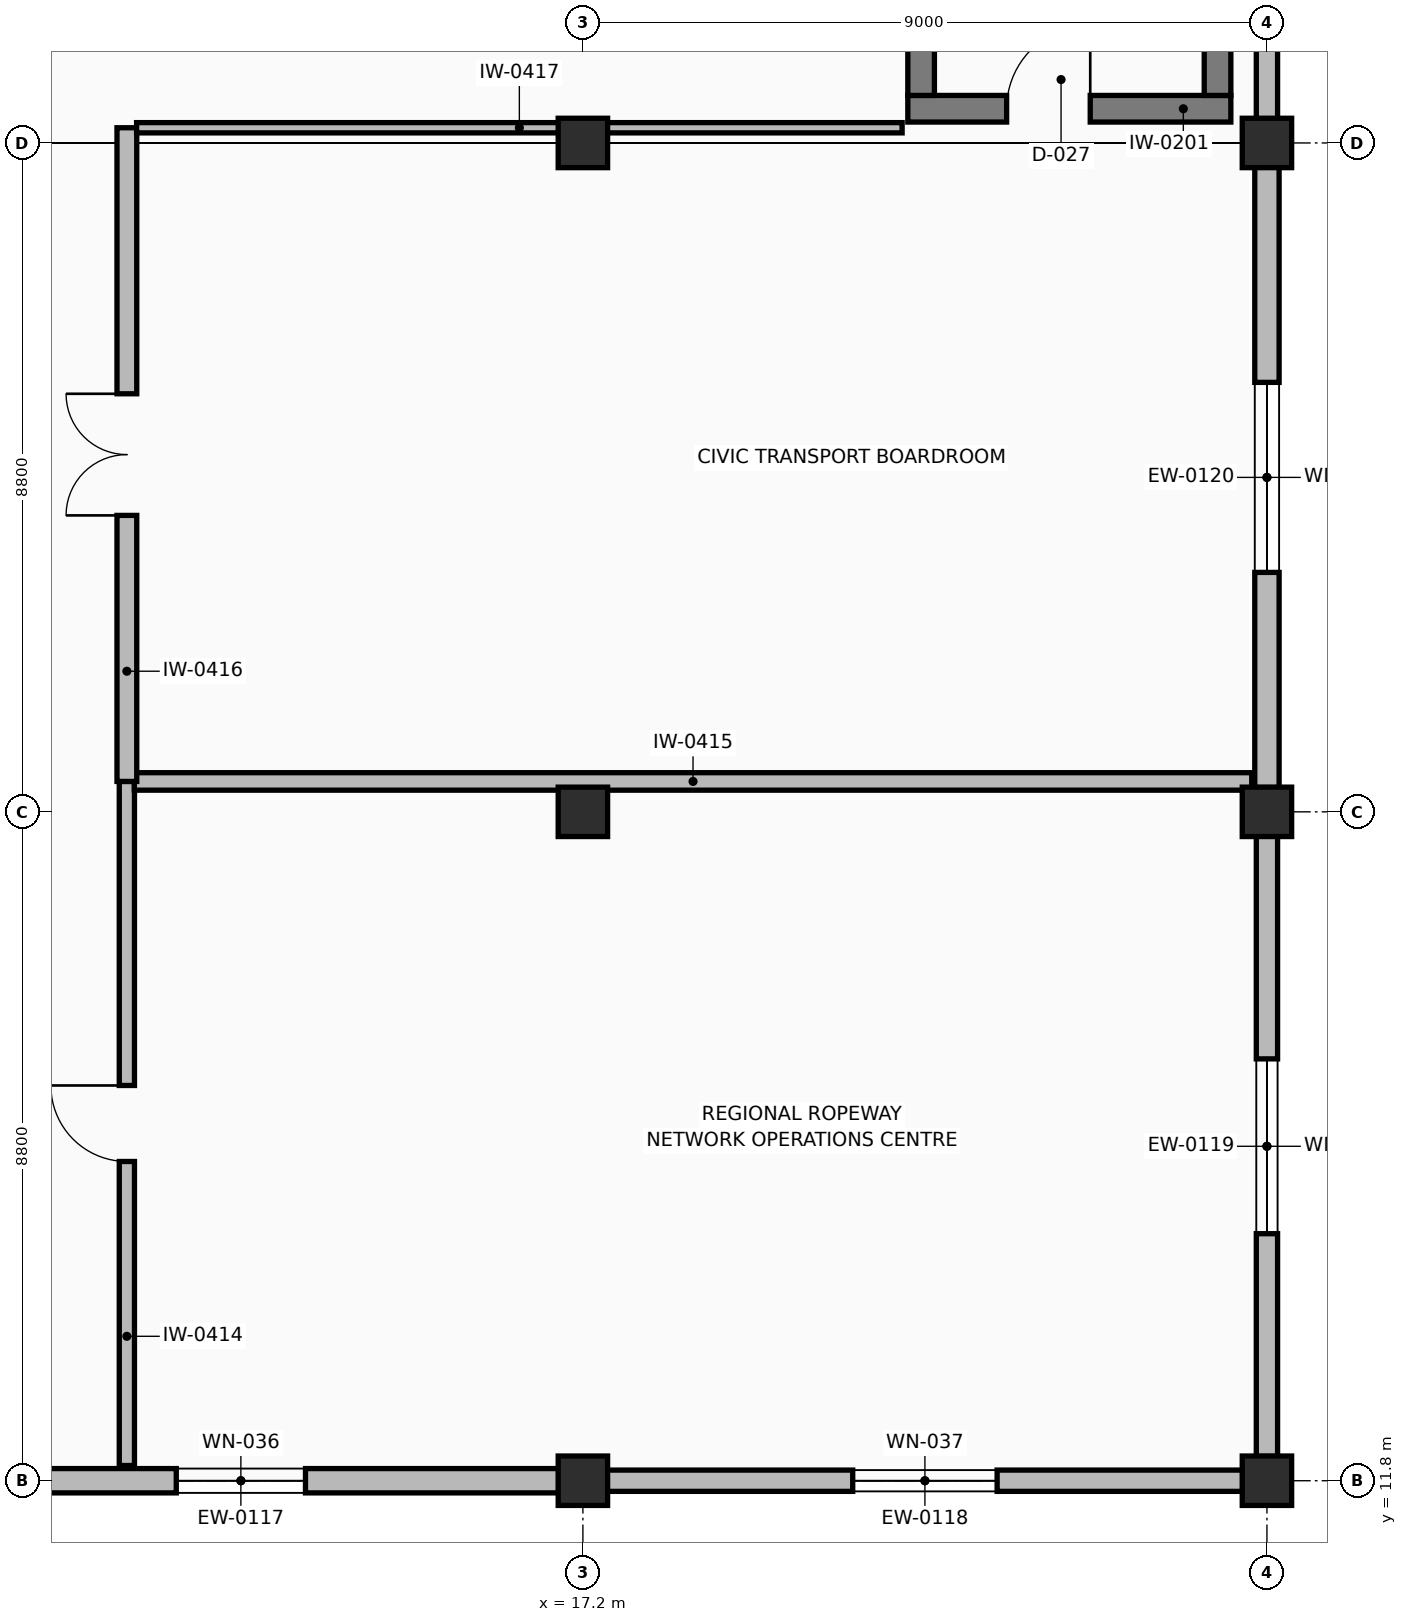
"""IFC4 building model, lengths in metres.
Left out: names, types, materials, properties, quantities, classifications, styles, units other than length and angle.
Written with IfcOpenShell. Run it as: python <this file> out.ifc"""

import sys

from ifc_helpers import new_model, si_unit, direction, frame, frame_2d, origin, origin_2d, place, context, subcontext, project, spatial, rectangle, extrude, element, fill, save


model = new_model("IFC4")
c1 = context("Model", 3, precision=1e-05, world=origin(), true_north=direction((0.0, 1.0)))
c2 = subcontext(c1, "Body", "Model", "MODEL_VIEW")
j1 = project(units=[si_unit("LENGTHUNIT", "METRE"), si_unit("PLANEANGLEUNIT", "RADIAN")], contexts=[c1])
p1 = place(None, origin())
s1 = spatial("IfcSite", under=j1, at=p1, CompositionType="ELEMENT")
p2 = place(p1, origin())
s2 = spatial("IfcBuilding", under=s1, at=p2, CompositionType="ELEMENT")
p3 = place(p2, frame((0.0, 0.0, 14.4)))
s3 = spatial("IfcBuildingStorey", under=s2, at=p3, CompositionType="ELEMENT", Elevation=14.4)
for number, where, z_axis, x_axis in (
    (1, (17.2, 11.8, 0.0), (0.0, 0.0, 1.0), (1.0, 0.0, 0.0)),
    (2, (17.2, 20.6, 0.0), (0.0, 0.0, 1.0), (1.0, 0.0, 0.0)),
    (3, (17.2, 29.4, 0.0), (0.0, 0.0, 1.0), (1.0, 0.0, 0.0)),
    (4, (26.2, 11.8, 0.0), (0.0, 0.0, 1.0), (1.0, 0.0, 0.0)),
    (5, (26.2, 20.6, 0.0), (0.0, 0.0, 1.0), (1.0, 0.0, 0.0)),
    (6, (26.2, 29.4, 0.0), (0.0, 0.0, 1.0), (1.0, 0.0, 0.0)),
):
    element("IfcColumn", number, at=place(p3, frame(where, z_axis=z_axis, x_axis=x_axis)), inside=s3, PredefinedType="COLUMN", context=c2, shape_type="SweptSolid", body=[
        extrude(rectangle(XDim=0.65, YDim=0.65, at=origin_2d()), origin(), (0.0, 0.0, 1.0), 4.5),
    ])
p4 = place(p3, frame((8.52, 11.8, 0.0), z_axis=(0.0, 0.0, 1.0), x_axis=(1.0, 0.0, 0.0)))
e7 = element("IfcWall", 7, at=p4, inside=s3, PredefinedType="SOLIDWALL", context=c2, shape_type="SweptSolid", body=[
    extrude(rectangle(XDim=8.36, YDim=0.32, at=frame_2d((4.18, 0.0))), origin(), (0.0, 0.0, 1.0), 3.375),
])
p5 = place(p4, frame((3.33, 0.0, 0.9)))
e8 = element("IfcOpeningElement", 8, at=p5, cuts=e7, PredefinedType="OPENING", context=c2, shape_type="SweptSolid", body=[
    extrude(rectangle(XDim=1.7, YDim=1.5, at=frame_2d((0.85, 0.75))), frame((0.0, 0.17, 0.0), z_axis=(0.0, -1.0, 0.0), x_axis=(1.0, 0.0, 0.0)), (0.0, 0.0, 1.0), 0.34),
])
p6 = place(p3, frame((17.52, 11.8, 0.0), z_axis=(0.0, 0.0, 1.0), x_axis=(1.0, 0.0, 0.0)))
e9 = element("IfcWall", 9, at=p6, inside=s3, PredefinedType="SOLIDWALL", context=c2, shape_type="SweptSolid", body=[
    extrude(rectangle(XDim=8.36, YDim=0.28, at=frame_2d((4.18, 0.0))), origin(), (0.0, 0.0, 1.0), 3.375),
])
p7 = place(p6, frame((3.23, 0.0, 0.9)))
e10 = element("IfcOpeningElement", 10, at=p7, cuts=e9, PredefinedType="OPENING", context=c2, shape_type="SweptSolid", body=[
    extrude(rectangle(XDim=1.9, YDim=1.55, at=frame_2d((0.95, 0.775))), frame((0.0, 0.15, 0.0), z_axis=(0.0, -1.0, 0.0), x_axis=(1.0, 0.0, 0.0)), (0.0, 0.0, 1.0), 0.3),
])
p8 = place(p3, frame((26.2, 12.12, 0.0), z_axis=(0.0, 0.0, 1.0), x_axis=(0.0, 1.0, 0.0)))
e11 = element("IfcWall", 11, at=p8, inside=s3, PredefinedType="SOLIDWALL", context=c2, shape_type="SweptSolid", body=[
    extrude(rectangle(XDim=8.16, YDim=0.28, at=frame_2d((4.08, 0.0))), origin(), (0.0, 0.0, 1.0), 3.375),
])
p9 = place(p8, frame((2.93, 0.0, 0.9)))
e12 = element("IfcOpeningElement", 12, at=p9, cuts=e11, PredefinedType="OPENING", context=c2, shape_type="SweptSolid", body=[
    extrude(rectangle(XDim=2.3, YDim=1.5, at=frame_2d((1.15, 0.75))), frame((0.0, 0.15, 0.0), z_axis=(0.0, -1.0, 0.0), x_axis=(1.0, 0.0, 0.0)), (0.0, 0.0, 1.0), 0.3),
])
p10 = place(p3, frame((26.2, 20.92, 0.0), z_axis=(0.0, 0.0, 1.0), x_axis=(0.0, 1.0, 0.0)))
e13 = element("IfcWall", 13, at=p10, inside=s3, PredefinedType="SOLIDWALL", context=c2, shape_type="SweptSolid", body=[
    extrude(rectangle(XDim=8.16, YDim=0.32, at=frame_2d((4.08, 0.0))), origin(), (0.0, 0.0, 1.0), 3.375),
])
p11 = place(p10, frame((2.83, 0.0, 0.9)))
e14 = element("IfcOpeningElement", 14, at=p11, cuts=e13, PredefinedType="OPENING", context=c2, shape_type="SweptSolid", body=[
    extrude(rectangle(XDim=2.5, YDim=1.45, at=frame_2d((1.25, 0.725))), frame((0.0, 0.17, 0.0), z_axis=(0.0, -1.0, 0.0), x_axis=(1.0, 0.0, 0.0)), (0.0, 0.0, 1.0), 0.34),
])
p12 = place(p3, frame((26.2, 29.72, 0.0), z_axis=(0.0, 0.0, 1.0), x_axis=(0.0, 1.0, 0.0)))
e15 = element("IfcWall", 15, at=p12, inside=s3, PredefinedType="SOLIDWALL", context=c2, shape_type="SweptSolid", body=[
    extrude(rectangle(XDim=8.16, YDim=0.28, at=frame_2d((4.08, 0.0))), origin(), (0.0, 0.0, 1.0), 3.375),
])
p13 = place(p12, frame((2.73, 0.0, 0.9)))
e16 = element("IfcOpeningElement", 16, at=p13, cuts=e15, PredefinedType="OPENING", context=c2, shape_type="SweptSolid", body=[
    extrude(rectangle(XDim=2.7, YDim=1.5, at=frame_2d((1.35, 0.75))), frame((0.0, 0.15, 0.0), z_axis=(0.0, -1.0, 0.0), x_axis=(1.0, 0.0, 0.0)), (0.0, 0.0, 1.0), 0.3),
])
p14 = place(p3, frame((21.475, 29.85, 0.0), z_axis=(0.0, 0.0, 1.0), x_axis=(1.0, 0.0, 0.0)))
e17 = element("IfcWall", 17, at=p14, inside=s3, PredefinedType="SHEAR", context=c2, shape_type="SweptSolid", body=[
    extrude(rectangle(XDim=4.25, YDim=0.35, at=frame_2d((2.125, 0.0))), origin(), (0.0, 0.0, 1.0), 4.19),
])
p15 = place(p14, frame((1.3, 0.0, 0.0)))
e18 = element("IfcOpeningElement", 18, at=p15, cuts=e17, PredefinedType="OPENING", context=c2, shape_type="SweptSolid", body=[
    extrude(rectangle(XDim=1.1, YDim=2.2, at=frame_2d((0.55, 1.1))), frame((0.0, 0.185, 0.0), z_axis=(0.0, -1.0, 0.0), x_axis=(1.0, 0.0, 0.0)), (0.0, 0.0, 1.0), 0.37),
])
for number, where, z_axis, x_axis in (
    (19, (25.55, 30.025, 0.0), (0.0, 0.0, 1.0), (0.0, 1.0, 0.0)),
    (20, (21.65, 37.475, 0.0), (0.0, 0.0, 1.0), (0.0, -1.0, 0.0)),
):
    element("IfcWall", number, at=place(p3, frame(where, z_axis=z_axis, x_axis=x_axis)), inside=s3, PredefinedType="SHEAR", context=c2, shape_type="SweptSolid", body=[
        extrude(rectangle(XDim=7.45, YDim=0.35, at=frame_2d((3.725, 0.0))), origin(), (0.0, 0.0, 1.0), 4.19),
    ])
p16 = place(p3, frame((11.2, 12.0, 0.0), z_axis=(0.0, 0.0, 1.0), x_axis=(0.0, 1.0, 0.0)))
e21 = element("IfcWall", 21, at=p16, inside=s3, PredefinedType="PARTITIONING", context=c2, shape_type="SweptSolid", body=[
    extrude(rectangle(XDim=9.0, YDim=0.2, at=frame_2d((4.5, 0.0))), origin(), (0.0, 0.0, 1.0), 3.365),
])
p17 = place(p16, frame((4.0, 0.0, 0.0)))
e22 = element("IfcOpeningElement", 22, at=p17, cuts=e21, PredefinedType="OPENING", context=c2, shape_type="SweptSolid", body=[
    extrude(rectangle(XDim=1.0, YDim=2.15, at=frame_2d((0.5, 1.075))), frame((0.0, 0.11, 0.0), z_axis=(0.0, -1.0, 0.0), x_axis=(1.0, 0.0, 0.0)), (0.0, 0.0, 1.0), 0.22),
])
p18 = place(p3, frame((11.298, 21.0, 0.0), z_axis=(0.0, 0.0, 1.0), x_axis=(1.0, 0.0, 0.0)))
e23 = element("IfcWall", 23, at=p18, inside=s3, PredefinedType="PARTITIONING", context=c2, shape_type="SweptSolid", body=[
    extrude(rectangle(XDim=14.702, YDim=0.23, at=frame_2d((7.351, 0.0))), origin(), (0.0, 0.0, 1.0), 3.365),
])
p19 = place(p3, frame((11.2, 21.0, 0.0), z_axis=(0.0, 0.0, 1.0), x_axis=(0.0, 1.0, 0.0)))
e24 = element("IfcWall", 24, at=p19, inside=s3, PredefinedType="PARTITIONING", context=c2, shape_type="SweptSolid", body=[
    extrude(rectangle(XDim=8.6, YDim=0.26, at=frame_2d((4.3, 0.0))), origin(), (0.0, 0.0, 1.0), 3.365),
])
p20 = place(p19, frame((3.5, 0.0, 0.0)))
e25 = element("IfcOpeningElement", 25, at=p20, cuts=e24, PredefinedType="OPENING", context=c2, shape_type="SweptSolid", body=[
    extrude(rectangle(XDim=1.6, YDim=2.25, at=frame_2d((0.8, 1.125))), frame((0.0, 0.14, 0.0), z_axis=(0.0, -1.0, 0.0), x_axis=(1.0, 0.0, 0.0)), (0.0, 0.0, 1.0), 0.28),
])
p21 = place(p3, frame((11.328, 29.6, 0.0), z_axis=(0.0, 0.0, 1.0), x_axis=(1.0, 0.0, 0.0)))
e26 = element("IfcWall", 26, at=p21, inside=s3, PredefinedType="PARTITIONING", context=c2, shape_type="SweptSolid", body=[
    extrude(rectangle(XDim=10.072, YDim=0.135, at=frame_2d((5.036, 0.0))), origin(), (0.0, 0.0, 1.0), 3.365),
])
p22 = place(p5, origin())
e27 = element("IfcWindow", 27, at=p22, inside=s3, PartitioningType="SINGLE_PANEL", PredefinedType="WINDOW", context=c2, shape_type="SweptSolid", body=[
    extrude(rectangle(XDim=1.7, YDim=1.5, at=frame_2d((0.85, 0.75))), frame((0.0, 0.03, 0.0), z_axis=(0.0, -1.0, 0.0), x_axis=(1.0, 0.0, 0.0)), (0.0, 0.0, 1.0), 0.06),
])
fill(e8, e27)
p23 = place(p7, origin())
e28 = element("IfcWindow", 28, at=p23, inside=s3, PartitioningType="SINGLE_PANEL", PredefinedType="WINDOW", context=c2, shape_type="SweptSolid", body=[
    extrude(rectangle(XDim=1.9, YDim=1.55, at=frame_2d((0.95, 0.775))), frame((0.0, 0.03, 0.0), z_axis=(0.0, -1.0, 0.0), x_axis=(1.0, 0.0, 0.0)), (0.0, 0.0, 1.0), 0.06),
])
fill(e10, e28)
p24 = place(p9, origin())
e29 = element("IfcWindow", 29, at=p24, inside=s3, PartitioningType="SINGLE_PANEL", PredefinedType="WINDOW", context=c2, shape_type="SweptSolid", body=[
    extrude(rectangle(XDim=2.3, YDim=1.5, at=frame_2d((1.15, 0.75))), frame((0.0, 0.03, 0.0), z_axis=(0.0, -1.0, 0.0), x_axis=(1.0, 0.0, 0.0)), (0.0, 0.0, 1.0), 0.06),
])
fill(e12, e29)
p25 = place(p11, origin())
e30 = element("IfcWindow", 30, at=p25, inside=s3, PartitioningType="SINGLE_PANEL", PredefinedType="WINDOW", context=c2, shape_type="SweptSolid", body=[
    extrude(rectangle(XDim=2.5, YDim=1.45, at=frame_2d((1.25, 0.725))), frame((0.0, 0.03, 0.0), z_axis=(0.0, -1.0, 0.0), x_axis=(1.0, 0.0, 0.0)), (0.0, 0.0, 1.0), 0.06),
])
fill(e14, e30)
p26 = place(p15, origin())
e31 = element("IfcDoor", 31, at=p26, inside=s3, OperationType="SINGLE_SWING_RIGHT", PredefinedType="DOOR", context=c2, shape_type="SweptSolid", body=[
    extrude(rectangle(XDim=1.1, YDim=2.2, at=frame_2d((0.55, 1.1))), frame((0.0, 0.025, 0.0), z_axis=(0.0, -1.0, 0.0), x_axis=(1.0, 0.0, 0.0)), (0.0, 0.0, 1.0), 0.05),
])
fill(e18, e31)
p27 = place(p17, origin())
e32 = element("IfcDoor", 32, at=p27, inside=s3, OperationType="SINGLE_SWING_RIGHT", PredefinedType="DOOR", context=c2, shape_type="SweptSolid", body=[
    extrude(rectangle(XDim=1.0, YDim=2.15, at=frame_2d((0.5, 1.075))), frame((0.0, 0.025, 0.0), z_axis=(0.0, -1.0, 0.0), x_axis=(1.0, 0.0, 0.0)), (0.0, 0.0, 1.0), 0.05),
])
fill(e22, e32)
p28 = place(p20, origin())
e33 = element("IfcDoor", 33, at=p28, inside=s3, OperationType="DOUBLE_SWING_LEFT", PredefinedType="DOOR", context=c2, shape_type="SweptSolid", body=[
    extrude(rectangle(XDim=1.6, YDim=2.25, at=frame_2d((0.8, 1.125))), frame((0.0, 0.025, 0.0), z_axis=(0.0, -1.0, 0.0), x_axis=(1.0, 0.0, 0.0)), (0.0, 0.0, 1.0), 0.05),
])
fill(e25, e33)
save(model, sys.argv[1])
